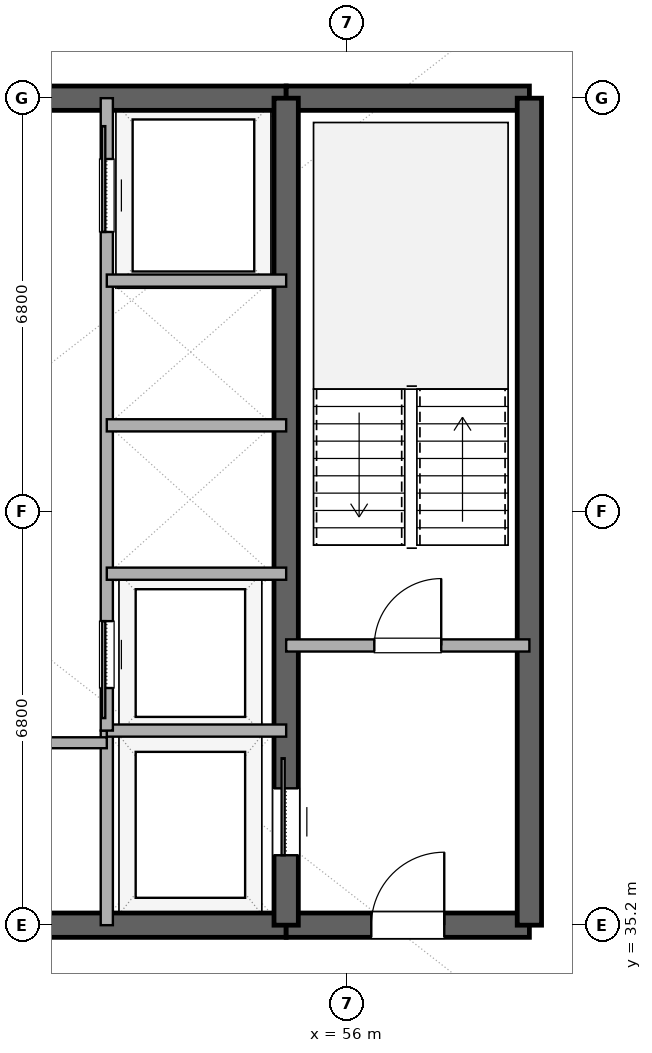
"""IFC4 building model, lengths in metres.
Left out: names, types, materials, properties, quantities, classifications, styles, units other than length and angle.
Written with IfcOpenShell. Run it as: python <this file> out.ifc"""

import sys

from ifc_helpers import new_model, si_unit, direction, frame, frame_2d, origin, place, context, subcontext, project, spatial, rectangle, extrude, element, fill, save


model = new_model("IFC4")
c1 = context("Model", 3, precision=1e-05, world=origin(), true_north=direction((0.0, 1.0)))
c2 = subcontext(c1, "Body", "Model", "MODEL_VIEW")
j1 = project(units=[si_unit("LENGTHUNIT", "METRE"), si_unit("PLANEANGLEUNIT", "RADIAN")], contexts=[c1])
p1 = place(None, origin())
s1 = spatial("IfcSite", under=j1, at=p1, CompositionType="ELEMENT")
p2 = place(p1, origin())
s2 = spatial("IfcBuilding", under=s1, at=p2, CompositionType="ELEMENT")
p3 = place(p2, frame((0.0, 0.0, 224.4)))
s3 = spatial("IfcBuildingStorey", under=s2, at=p3, CompositionType="ELEMENT", Elevation=224.4)
p4 = place(p3, frame((41.0, 35.2, 0.0), z_axis=(0.0, 0.0, 1.0), x_axis=(1.0, 0.0, 0.0)))
e1 = element("IfcWall", 1, at=p4, inside=s3, PredefinedType="SHEAR", context=c2, shape_type="SweptSolid", body=[
    extrude(rectangle(XDim=14.0, YDim=0.4, at=frame_2d((7.0, 0.0))), origin(), (0.0, 0.0, 1.0), 3.36),
])
p5 = place(p4, frame((6.1, 0.0, 0.0)))
e2 = element("IfcOpeningElement", 2, at=p5, cuts=e1, PredefinedType="OPENING", context=c2, shape_type="SweptSolid", body=[
    extrude(rectangle(XDim=1.8, YDim=2.25, at=frame_2d((0.9, 1.125))), frame((0.0, 0.21, 0.0), z_axis=(0.0, -1.0, 0.0), x_axis=(1.0, 0.0, 0.0)), (0.0, 0.0, 1.0), 0.42),
])
p6 = place(p3, frame((55.0, 35.2, 0.0), z_axis=(0.0, 0.0, 1.0), x_axis=(1.0, 0.0, 0.0)))
e3 = element("IfcWall", 3, at=p6, inside=s3, PredefinedType="SHEAR", context=c2, shape_type="SweptSolid", body=[
    extrude(rectangle(XDim=4.0, YDim=0.4, at=frame_2d((2.0, 0.0))), origin(), (0.0, 0.0, 1.0), 3.36),
])
p7 = place(p6, frame((1.4, 0.0, 0.0)))
e4 = element("IfcOpeningElement", 4, at=p7, cuts=e3, PredefinedType="OPENING", context=c2, shape_type="SweptSolid", body=[
    extrude(rectangle(XDim=1.2, YDim=2.15, at=frame_2d((0.6, 1.075))), frame((0.0, 0.21, 0.0), z_axis=(0.0, -1.0, 0.0), x_axis=(1.0, 0.0, 0.0)), (0.0, 0.0, 1.0), 0.42),
])
p8 = place(p3, frame((41.0, 48.8, 0.0), z_axis=(0.0, 0.0, 1.0), x_axis=(1.0, 0.0, 0.0)))
e5 = element("IfcWall", 5, at=p8, inside=s3, PredefinedType="SHEAR", context=c2, shape_type="SweptSolid", body=[
    extrude(rectangle(XDim=14.0, YDim=0.4, at=frame_2d((7.0, 0.0))), origin(), (0.0, 0.0, 1.0), 3.36),
])
p9 = place(p8, frame((6.1, 0.0, 0.0)))
e6 = element("IfcOpeningElement", 6, at=p9, cuts=e5, PredefinedType="OPENING", context=c2, shape_type="SweptSolid", body=[
    extrude(rectangle(XDim=1.8, YDim=2.25, at=frame_2d((0.9, 1.125))), frame((0.0, 0.21, 0.0), z_axis=(0.0, -1.0, 0.0), x_axis=(1.0, 0.0, 0.0)), (0.0, 0.0, 1.0), 0.42),
])
p10 = place(p3, frame((55.0, 48.8, 0.0), z_axis=(0.0, 0.0, 1.0), x_axis=(1.0, 0.0, 0.0)))
e7 = element("IfcWall", 7, at=p10, inside=s3, PredefinedType="SHEAR", context=c2, shape_type="SweptSolid", body=[
    extrude(rectangle(XDim=4.0, YDim=0.4, at=frame_2d((2.0, 0.0))), origin(), (0.0, 0.0, 1.0), 3.36),
])
p11 = place(p3, frame((59.0, 35.2, 0.0), z_axis=(0.0, 0.0, 1.0), x_axis=(0.0, 1.0, 0.0)))
e8 = element("IfcWall", 8, at=p11, inside=s3, PredefinedType="SHEAR", context=c2, shape_type="SweptSolid", body=[
    extrude(rectangle(XDim=13.6, YDim=0.4, at=frame_2d((6.8, 0.0))), origin(), (0.0, 0.0, 1.0), 3.36),
])
p12 = place(p3, frame((55.0, 35.2, 0.0), z_axis=(0.0, 0.0, 1.0), x_axis=(0.0, 1.0, 0.0)))
e9 = element("IfcWall", 9, at=p12, inside=s3, PredefinedType="SHEAR", context=c2, shape_type="SweptSolid", body=[
    extrude(rectangle(XDim=13.6, YDim=0.4, at=frame_2d((6.8, 0.0))), origin(), (0.0, 0.0, 1.0), 3.36),
])
p13 = place(p12, frame((1.15, 0.0, 0.0)))
e10 = element("IfcOpeningElement", 10, at=p13, cuts=e9, PredefinedType="OPENING", context=c2, shape_type="SweptSolid", body=[
    extrude(rectangle(XDim=1.1, YDim=2.2, at=frame_2d((0.55, 1.1))), frame((0.0, 0.21, 0.0), z_axis=(0.0, -1.0, 0.0), x_axis=(1.0, 0.0, 0.0)), (0.0, 0.0, 1.0), 0.42),
])
p14 = place(p3, frame((55.0, 39.8, 0.0), z_axis=(0.0, 0.0, 1.0), x_axis=(1.0, 0.0, 0.0)))
e11 = element("IfcWall", 11, at=p14, inside=s3, PredefinedType="SOLIDWALL", context=c2, shape_type="SweptSolid", body=[
    extrude(rectangle(XDim=4.0, YDim=0.2, at=frame_2d((2.0, 0.0))), origin(), (0.0, 0.0, 1.0), 2.72),
])
p15 = place(p14, frame((1.45, 0.0, 0.0)))
e12 = element("IfcOpeningElement", 12, at=p15, cuts=e11, PredefinedType="OPENING", context=c2, shape_type="SweptSolid", body=[
    extrude(rectangle(XDim=1.1, YDim=2.15, at=frame_2d((0.55, 1.075))), frame((0.0, 0.11, 0.0), z_axis=(0.0, -1.0, 0.0), x_axis=(1.0, 0.0, 0.0)), (0.0, 0.0, 1.0), 0.22),
])
p16 = place(p3, frame((52.05, 35.2, 0.0), z_axis=(0.0, 0.0, 1.0), x_axis=(0.0, 1.0, 0.0)))
e13 = element("IfcWall", 13, at=p16, inside=s3, PredefinedType="SOLIDWALL", context=c2, shape_type="SweptSolid", body=[
    extrude(rectangle(XDim=3.2, YDim=0.2, at=frame_2d((1.6, 0.0))), origin(), (0.0, 0.0, 1.0), 2.72),
])
p17 = place(p3, frame((52.05, 38.4, 0.0), z_axis=(0.0, 0.0, 1.0), x_axis=(1.0, 0.0, 0.0)))
e14 = element("IfcWall", 14, at=p17, inside=s3, PredefinedType="SOLIDWALL", context=c2, shape_type="SweptSolid", body=[
    extrude(rectangle(XDim=2.95, YDim=0.2, at=frame_2d((1.475, 0.0))), origin(), (0.0, 0.0, 1.0), 2.72),
])
p18 = place(p3, frame((52.05, 38.4, 0.0), z_axis=(0.0, 0.0, 1.0), x_axis=(0.0, 1.0, 0.0)))
e15 = element("IfcWall", 15, at=p18, inside=s3, PredefinedType="SOLIDWALL", context=c2, shape_type="SweptSolid", body=[
    extrude(rectangle(XDim=10.4, YDim=0.2, at=frame_2d((5.2, 0.0))), origin(), (0.0, 0.0, 1.0), 2.72),
])
p19 = place(p18, frame((0.7, 0.0, 0.0)))
e16 = element("IfcOpeningElement", 16, at=p19, cuts=e15, PredefinedType="OPENING", context=c2, shape_type="SweptSolid", body=[
    extrude(rectangle(XDim=1.1, YDim=2.2, at=frame_2d((0.55, 1.1))), frame((0.0, 0.11, 0.0), z_axis=(0.0, -1.0, 0.0), x_axis=(1.0, 0.0, 0.0)), (0.0, 0.0, 1.0), 0.22),
])
p20 = place(p18, frame((8.2, 0.0, 0.0)))
e17 = element("IfcOpeningElement", 17, at=p20, cuts=e15, PredefinedType="OPENING", context=c2, shape_type="SweptSolid", body=[
    extrude(rectangle(XDim=1.2, YDim=2.2, at=frame_2d((0.6, 1.1))), frame((0.0, 0.11, 0.0), z_axis=(0.0, -1.0, 0.0), x_axis=(1.0, 0.0, 0.0)), (0.0, 0.0, 1.0), 0.22),
])
for number, where, z_axis, x_axis in (
    (18, (52.05, 40.98, 0.0), (0.0, 0.0, 1.0), (1.0, 0.0, 0.0)),
    (19, (52.05, 43.42, 0.0), (0.0, 0.0, 1.0), (1.0, 0.0, 0.0)),
    (20, (52.05, 45.8, 0.0), (0.0, 0.0, 1.0), (1.0, 0.0, 0.0)),
):
    element("IfcWall", number, at=place(p3, frame(where, z_axis=z_axis, x_axis=x_axis)), inside=s3, PredefinedType="SOLIDWALL", context=c2, shape_type="SweptSolid", body=[
        extrude(rectangle(XDim=2.95, YDim=0.2, at=frame_2d((1.475, 0.0))), origin(), (0.0, 0.0, 1.0), 2.72),
    ])
p21 = place(p3, frame((49.9, 38.2, 0.0), z_axis=(0.0, 0.0, 1.0), x_axis=(1.0, 0.0, 0.0)))
e21 = element("IfcWall", 21, at=p21, inside=s3, PredefinedType="PLUMBINGWALL", context=c2, shape_type="SweptSolid", body=[
    extrude(rectangle(XDim=2.15, YDim=0.18, at=frame_2d((1.075, 0.0))), origin(), (0.0, 0.0, 1.0), 2.72),
])
p22 = place(p13, origin())
e22 = element("IfcDoor", 22, at=p22, inside=s3, OperationType="SLIDING_TO_RIGHT", PredefinedType="DOOR", context=c2, shape_type="SweptSolid", body=[
    extrude(rectangle(XDim=1.1, YDim=2.2, at=frame_2d((0.55, 1.1))), frame((0.0, 0.025, 0.0), z_axis=(0.0, -1.0, 0.0), x_axis=(1.0, 0.0, 0.0)), (0.0, 0.0, 1.0), 0.05),
])
fill(e10, e22)
p23 = place(p7, origin())
e23 = element("IfcDoor", 23, at=p23, inside=s3, OperationType="SINGLE_SWING_RIGHT", PredefinedType="DOOR", context=c2, shape_type="SweptSolid", body=[
    extrude(rectangle(XDim=1.2, YDim=2.15, at=frame_2d((0.6, 1.075))), frame((0.0, 0.025, 0.0), z_axis=(0.0, -1.0, 0.0), x_axis=(1.0, 0.0, 0.0)), (0.0, 0.0, 1.0), 0.05),
])
fill(e4, e23)
p24 = place(p15, origin())
e24 = element("IfcDoor", 24, at=p24, inside=s3, OperationType="SINGLE_SWING_RIGHT", PredefinedType="DOOR", context=c2, shape_type="SweptSolid", body=[
    extrude(rectangle(XDim=1.1, YDim=2.15, at=frame_2d((0.55, 1.075))), frame((0.0, 0.025, 0.0), z_axis=(0.0, -1.0, 0.0), x_axis=(1.0, 0.0, 0.0)), (0.0, 0.0, 1.0), 0.05),
])
fill(e12, e24)
p25 = place(p19, origin())
e25 = element("IfcDoor", 25, at=p25, inside=s3, OperationType="SLIDING_TO_LEFT", PredefinedType="DOOR", context=c2, shape_type="SweptSolid", body=[
    extrude(rectangle(XDim=1.1, YDim=2.2, at=frame_2d((0.55, 1.1))), frame((0.0, 0.025, 0.0), z_axis=(0.0, -1.0, 0.0), x_axis=(1.0, 0.0, 0.0)), (0.0, 0.0, 1.0), 0.05),
])
fill(e16, e25)
p26 = place(p20, origin())
e26 = element("IfcDoor", 26, at=p26, inside=s3, OperationType="SLIDING_TO_RIGHT", PredefinedType="DOOR", context=c2, shape_type="SweptSolid", body=[
    extrude(rectangle(XDim=1.2, YDim=2.2, at=frame_2d((0.6, 1.1))), frame((0.0, 0.025, 0.0), z_axis=(0.0, -1.0, 0.0), x_axis=(1.0, 0.0, 0.0)), (0.0, 0.0, 1.0), 0.05),
])
fill(e17, e26)
save(model, sys.argv[1])
